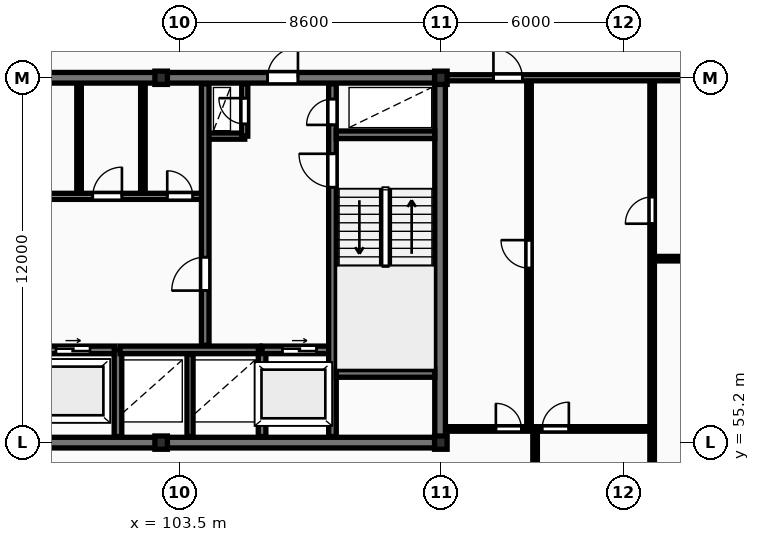
"""IFC4 building model, lengths in metres.
Left out: names, types, materials, properties, quantities, classifications, styles, units other than length and angle.
Written with IfcOpenShell. Run it as: python <this file> out.ifc"""

import sys

from ifc_helpers import new_model, si_unit, direction, frame, frame_2d, origin, origin_2d, place, context, subcontext, project, spatial, rectangle, i_section, extrude, element, fill, save


model = new_model("IFC4")
c1 = context("Model", 3, precision=1e-05, world=origin(), true_north=direction((0.0, 1.0)))
c2 = subcontext(c1, "Body", "Model", "MODEL_VIEW")
j1 = project(units=[si_unit("LENGTHUNIT", "METRE"), si_unit("PLANEANGLEUNIT", "RADIAN")], contexts=[c1])
p1 = place(None, origin())
s1 = spatial("IfcSite", under=j1, at=p1, CompositionType="ELEMENT")
p2 = place(p1, origin())
s2 = spatial("IfcBuilding", under=s1, at=p2, CompositionType="ELEMENT")
p3 = place(p2, frame((0.0, 0.0, 150.1)))
s3 = spatial("IfcBuildingStorey", under=s2, at=p3, CompositionType="ELEMENT", Elevation=150.1)
for number, where, z_axis, x_axis in (
    (1, (102.9, 55.2, 0.0), (0.0, 0.0, 1.0), (1.0, 0.0, 0.0)),
    (2, (102.9, 67.2, 0.0), (0.0, 0.0, 1.0), (1.0, 0.0, 0.0)),
    (3, (112.1, 55.2, 0.0), (0.0, 0.0, 1.0), (1.0, 0.0, 0.0)),
    (4, (112.1, 67.2, 0.0), (0.0, 0.0, 1.0), (1.0, 0.0, 0.0)),
):
    element("IfcColumn", number, at=place(p3, frame(where, z_axis=z_axis, x_axis=x_axis)), inside=s3, PredefinedType="COLUMN", context=c2, shape_type="SweptSolid", body=[
        extrude(i_section(OverallWidth=0.412, OverallDepth=0.437, WebThickness=0.036, FlangeThickness=0.052, FilletRadius=0.015, at=origin_2d()), origin(), (0.0, 0.0, 1.0), 3.6),
    ])
p4 = place(p3, frame((75.95, 55.2, 0.0), z_axis=(0.0, 0.0, 1.0), x_axis=(1.0, 0.0, 0.0)))
e5 = element("IfcWall", 5, at=p4, inside=s3, PredefinedType="SHEAR", context=c2, shape_type="SweptSolid", body=[
    extrude(rectangle(XDim=36.3, YDim=0.35, at=frame_2d((18.15, 0.0))), origin(), (0.0, 0.0, 1.0), 3.6),
])
p5 = place(p4, frame((15.1, 0.0, 0.0)))
e6 = element("IfcOpeningElement", 6, at=p5, cuts=e5, PredefinedType="OPENING", context=c2, shape_type="SweptSolid", body=[
    extrude(rectangle(XDim=1.1, YDim=2.1, at=frame_2d((0.55, 1.05))), frame((0.0, 0.185, 0.0), z_axis=(0.0, -1.0, 0.0), x_axis=(1.0, 0.0, 0.0)), (0.0, 0.0, 1.0), 0.37),
])
p6 = place(p3, frame((112.075, 55.375, 0.0), z_axis=(0.0, 0.0, 1.0), x_axis=(0.0, 1.0, 0.0)))
e7 = element("IfcWall", 7, at=p6, inside=s3, PredefinedType="SHEAR", context=c2, shape_type="SweptSolid", body=[
    extrude(rectangle(XDim=11.65, YDim=0.35, at=frame_2d((5.825, 0.0))), origin(), (0.0, 0.0, 1.0), 3.6),
])
p7 = place(p3, frame((75.95, 67.2, 0.0), z_axis=(0.0, 0.0, 1.0), x_axis=(1.0, 0.0, 0.0)))
e8 = element("IfcWall", 8, at=p7, inside=s3, PredefinedType="SHEAR", context=c2, shape_type="SweptSolid", body=[
    extrude(rectangle(XDim=36.3, YDim=0.35, at=frame_2d((18.15, 0.0))), origin(), (0.0, 0.0, 1.0), 3.6),
])
p8 = place(p7, frame((5.25, 0.0, 0.0)))
e9 = element("IfcOpeningElement", 9, at=p8, cuts=e8, PredefinedType="OPENING", context=c2, shape_type="SweptSolid", body=[
    extrude(rectangle(XDim=1.0, YDim=2.15, at=frame_2d((0.5, 1.075))), frame((0.0, 0.185, 0.0), z_axis=(0.0, -1.0, 0.0), x_axis=(1.0, 0.0, 0.0)), (0.0, 0.0, 1.0), 0.37),
])
p9 = place(p7, frame((21.6, 0.0, 0.0)))
e10 = element("IfcOpeningElement", 10, at=p9, cuts=e8, PredefinedType="OPENING", context=c2, shape_type="SweptSolid", body=[
    extrude(rectangle(XDim=1.5, YDim=2.2, at=frame_2d((0.75, 1.1))), frame((0.0, 0.185, 0.0), z_axis=(0.0, -1.0, 0.0), x_axis=(1.0, 0.0, 0.0)), (0.0, 0.0, 1.0), 0.37),
])
p10 = place(p7, frame((30.45, 0.0, 0.0)))
e11 = element("IfcOpeningElement", 11, at=p10, cuts=e8, PredefinedType="OPENING", context=c2, shape_type="SweptSolid", body=[
    extrude(rectangle(XDim=1.0, YDim=2.15, at=frame_2d((0.5, 1.075))), frame((0.0, 0.185, 0.0), z_axis=(0.0, -1.0, 0.0), x_axis=(1.0, 0.0, 0.0)), (0.0, 0.0, 1.0), 0.37),
])
p11 = place(p3, frame((93.02, 58.25, 0.0), z_axis=(0.0, 0.0, 1.0), x_axis=(1.0, 0.0, 0.0)))
e12 = element("IfcWall", 12, at=p11, inside=s3, PredefinedType="SHEAR", context=c2, shape_type="SweptSolid", body=[
    extrude(rectangle(XDim=8.36, YDim=0.25, at=frame_2d((4.18, 0.0))), origin(), (0.0, 0.0, 1.0), 3.6),
])
p12 = place(p11, frame((0.82, 0.0, 0.0)))
e13 = element("IfcOpeningElement", 13, at=p12, cuts=e12, PredefinedType="OPENING", context=c2, shape_type="SweptSolid", body=[
    extrude(rectangle(XDim=1.12, YDim=2.12, at=frame_2d((0.56, 1.06))), frame((0.0, 0.135, 0.0), z_axis=(0.0, -1.0, 0.0), x_axis=(1.0, 0.0, 0.0)), (0.0, 0.0, 1.0), 0.27),
])
p13 = place(p11, frame((3.62, 0.0, 0.0)))
e14 = element("IfcOpeningElement", 14, at=p13, cuts=e12, PredefinedType="OPENING", context=c2, shape_type="SweptSolid", body=[
    extrude(rectangle(XDim=1.12, YDim=2.12, at=frame_2d((0.56, 1.06))), frame((0.0, 0.135, 0.0), z_axis=(0.0, -1.0, 0.0), x_axis=(1.0, 0.0, 0.0)), (0.0, 0.0, 1.0), 0.27),
])
p14 = place(p11, frame((6.42, 0.0, 0.0)))
e15 = element("IfcOpeningElement", 15, at=p14, cuts=e12, PredefinedType="OPENING", context=c2, shape_type="SweptSolid", body=[
    extrude(rectangle(XDim=1.12, YDim=2.12, at=frame_2d((0.56, 1.06))), frame((0.0, 0.135, 0.0), z_axis=(0.0, -1.0, 0.0), x_axis=(1.0, 0.0, 0.0)), (0.0, 0.0, 1.0), 0.27),
])
p15 = place(p3, frame((101.48, 55.4, 0.0), z_axis=(0.0, 0.0, 1.0), x_axis=(0.0, 1.0, 0.0)))
e16 = element("IfcWall", 16, at=p15, inside=s3, PredefinedType="SHEAR", context=c2, shape_type="SweptSolid", body=[
    extrude(rectangle(XDim=2.85, YDim=0.25, at=frame_2d((1.425, 0.0))), origin(), (0.0, 0.0, 1.0), 3.6),
])
p16 = place(p3, frame((103.85, 55.4, 0.0), z_axis=(0.0, 0.0, 1.0), x_axis=(0.0, 1.0, 0.0)))
e17 = element("IfcWall", 17, at=p16, inside=s3, PredefinedType="PARTITIONING", context=c2, shape_type="SweptSolid", body=[
    extrude(rectangle(XDim=2.72, YDim=0.2, at=frame_2d((1.36, 0.0))), origin(), (0.0, 0.0, 1.0), 3.31),
])
p17 = place(p3, frame((101.55, 58.25, 0.0), z_axis=(0.0, 0.0, 1.0), x_axis=(1.0, 0.0, 0.0)))
e18 = element("IfcWall", 18, at=p17, inside=s3, PredefinedType="SHEAR", context=c2, shape_type="SweptSolid", body=[
    extrude(rectangle(XDim=4.6, YDim=0.25, at=frame_2d((2.3, 0.0))), origin(), (0.0, 0.0, 1.0), 3.6),
])
p18 = place(p3, frame((106.22, 55.4, 0.0), z_axis=(0.0, 0.0, 1.0), x_axis=(0.0, 1.0, 0.0)))
e19 = element("IfcWall", 19, at=p18, inside=s3, PredefinedType="SHEAR", context=c2, shape_type="SweptSolid", body=[
    extrude(rectangle(XDim=2.85, YDim=0.25, at=frame_2d((1.425, 0.0))), origin(), (0.0, 0.0, 1.0), 3.6),
])
p19 = place(p3, frame((106.22, 58.25, 0.0), z_axis=(0.0, 0.0, 1.0), x_axis=(1.0, 0.0, 0.0)))
e20 = element("IfcWall", 20, at=p19, inside=s3, PredefinedType="SHEAR", context=c2, shape_type="SweptSolid", body=[
    extrude(rectangle(XDim=2.46, YDim=0.25, at=frame_2d((1.23, 0.0))), origin(), (0.0, 0.0, 1.0), 3.6),
])
p20 = place(p19, frame((0.67, 0.0, 0.0)))
e21 = element("IfcOpeningElement", 21, at=p20, cuts=e20, PredefinedType="OPENING", context=c2, shape_type="SweptSolid", body=[
    extrude(rectangle(XDim=1.12, YDim=2.12, at=frame_2d((0.56, 1.06))), frame((0.0, 0.135, 0.0), z_axis=(0.0, -1.0, 0.0), x_axis=(1.0, 0.0, 0.0)), (0.0, 0.0, 1.0), 0.27),
])
for number, where, z_axis, x_axis in (
    (22, (102.3, 63.4, 0.0), (0.0, 0.0, 1.0), (0.0, 1.0, 0.0)),
    (23, (100.2, 63.4, 0.0), (0.0, 0.0, 1.0), (0.0, 1.0, 0.0)),
):
    element("IfcWall", number, at=place(p3, frame(where, z_axis=z_axis, x_axis=x_axis)), inside=s3, PredefinedType="PARTITIONING", context=c2, shape_type="SweptSolid", body=[
        extrude(rectangle(XDim=3.6, YDim=0.15, at=frame_2d((1.8, 0.0))), origin(), (0.0, 0.0, 1.0), 3.31),
    ])
p21 = place(p3, frame((84.42, 63.3, 0.0), z_axis=(0.0, 0.0, 1.0), x_axis=(1.0, 0.0, 0.0)))
e24 = element("IfcWall", 24, at=p21, inside=s3, PredefinedType="PARTITIONING", context=c2, shape_type="SweptSolid", body=[
    extrude(rectangle(XDim=19.83, YDim=0.2, at=frame_2d((9.915, 0.0))), origin(), (0.0, 0.0, 1.0), 3.31),
])
p22 = place(p21, frame((1.15, 0.0, 0.0)))
e25 = element("IfcOpeningElement", 25, at=p22, cuts=e24, PredefinedType="OPENING", context=c2, shape_type="SweptSolid", body=[
    extrude(rectangle(XDim=0.85, YDim=2.05, at=frame_2d((0.425, 1.025))), frame((0.0, 0.11, 0.0), z_axis=(0.0, -1.0, 0.0), x_axis=(1.0, 0.0, 0.0)), (0.0, 0.0, 1.0), 0.22),
])
p23 = place(p21, frame((3.25, 0.0, 0.0)))
e26 = element("IfcOpeningElement", 26, at=p23, cuts=e24, PredefinedType="OPENING", context=c2, shape_type="SweptSolid", body=[
    extrude(rectangle(XDim=0.85, YDim=2.05, at=frame_2d((0.425, 1.025))), frame((0.0, 0.11, 0.0), z_axis=(0.0, -1.0, 0.0), x_axis=(1.0, 0.0, 0.0)), (0.0, 0.0, 1.0), 0.22),
])
p24 = place(p21, frame((13.08, 0.0, 0.0)))
e27 = element("IfcOpeningElement", 27, at=p24, cuts=e24, PredefinedType="OPENING", context=c2, shape_type="SweptSolid", body=[
    extrude(rectangle(XDim=1.5, YDim=2.2, at=frame_2d((0.75, 1.1))), frame((0.0, 0.11, 0.0), z_axis=(0.0, -1.0, 0.0), x_axis=(1.0, 0.0, 0.0)), (0.0, 0.0, 1.0), 0.22),
])
p25 = place(p21, frame((5.53, 0.0, 0.0)))
e28 = element("IfcOpeningElement", 28, at=p25, cuts=e24, PredefinedType="OPENING", context=c2, shape_type="SweptSolid", body=[
    extrude(rectangle(XDim=0.88, YDim=2.06, at=frame_2d((0.44, 1.03))), frame((0.0, 0.11, 0.0), z_axis=(0.0, -1.0, 0.0), x_axis=(1.0, 0.0, 0.0)), (0.0, 0.0, 1.0), 0.22),
])
p26 = place(p21, frame((7.68, 0.0, 0.0)))
e29 = element("IfcOpeningElement", 29, at=p26, cuts=e24, PredefinedType="OPENING", context=c2, shape_type="SweptSolid", body=[
    extrude(rectangle(XDim=0.88, YDim=2.06, at=frame_2d((0.44, 1.03))), frame((0.0, 0.11, 0.0), z_axis=(0.0, -1.0, 0.0), x_axis=(1.0, 0.0, 0.0)), (0.0, 0.0, 1.0), 0.22),
])
p27 = place(p21, frame((10.43, 0.0, 0.0)))
e30 = element("IfcOpeningElement", 30, at=p27, cuts=e24, PredefinedType="OPENING", context=c2, shape_type="SweptSolid", body=[
    extrude(rectangle(XDim=0.85, YDim=2.05, at=frame_2d((0.425, 1.025))), frame((0.0, 0.11, 0.0), z_axis=(0.0, -1.0, 0.0), x_axis=(1.0, 0.0, 0.0)), (0.0, 0.0, 1.0), 0.22),
])
p28 = place(p21, frame((16.23, 0.0, 0.0)))
e31 = element("IfcOpeningElement", 31, at=p28, cuts=e24, PredefinedType="OPENING", context=c2, shape_type="SweptSolid", body=[
    extrude(rectangle(XDim=0.96, YDim=2.1, at=frame_2d((0.48, 1.05))), frame((0.0, 0.11, 0.0), z_axis=(0.0, -1.0, 0.0), x_axis=(1.0, 0.0, 0.0)), (0.0, 0.0, 1.0), 0.22),
])
p29 = place(p21, frame((18.68, 0.0, 0.0)))
e32 = element("IfcOpeningElement", 32, at=p29, cuts=e24, PredefinedType="OPENING", context=c2, shape_type="SweptSolid", body=[
    extrude(rectangle(XDim=0.84, YDim=2.04, at=frame_2d((0.42, 1.02))), frame((0.0, 0.11, 0.0), z_axis=(0.0, -1.0, 0.0), x_axis=(1.0, 0.0, 0.0)), (0.0, 0.0, 1.0), 0.22),
])
p30 = place(p3, frame((104.45, 65.28, 0.0), z_axis=(0.0, 0.0, 1.0), x_axis=(1.0, 0.0, 0.0)))
e33 = element("IfcWall", 33, at=p30, inside=s3, PredefinedType="PARTITIONING", context=c2, shape_type="SweptSolid", body=[
    extrude(rectangle(XDim=1.2, YDim=0.2, at=frame_2d((0.6, 0.0))), origin(), (0.0, 0.0, 1.0), 3.31),
])
p31 = place(p3, frame((105.65, 65.28, 0.0), z_axis=(0.0, 0.0, 1.0), x_axis=(0.0, 1.0, 0.0)))
e34 = element("IfcWall", 34, at=p31, inside=s3, PredefinedType="PARTITIONING", context=c2, shape_type="SweptSolid", body=[
    extrude(rectangle(XDim=1.72, YDim=0.2, at=frame_2d((0.86, 0.0))), origin(), (0.0, 0.0, 1.0), 3.31),
])
p32 = place(p31, frame((0.4, 0.0, 0.0)))
e35 = element("IfcOpeningElement", 35, at=p32, cuts=e34, PredefinedType="OPENING", context=c2, shape_type="SweptSolid", body=[
    extrude(rectangle(XDim=0.85, YDim=2.05, at=frame_2d((0.425, 1.025))), frame((0.0, 0.11, 0.0), z_axis=(0.0, -1.0, 0.0), x_axis=(1.0, 0.0, 0.0)), (0.0, 0.0, 1.0), 0.22),
])
p33 = place(p3, frame((104.35, 58.4, 0.0), z_axis=(0.0, 0.0, 1.0), x_axis=(0.0, 1.0, 0.0)))
e36 = element("IfcWall", 36, at=p33, inside=s3, PredefinedType="SHEAR", context=c2, shape_type="SweptSolid", body=[
    extrude(rectangle(XDim=8.6, YDim=0.25, at=frame_2d((4.3, 0.0))), origin(), (0.0, 0.0, 1.0), 3.6),
])
p34 = place(p33, frame((1.8, 0.0, 0.0)))
e37 = element("IfcOpeningElement", 37, at=p34, cuts=e36, PredefinedType="OPENING", context=c2, shape_type="SweptSolid", body=[
    extrude(rectangle(XDim=1.1, YDim=2.1, at=frame_2d((0.55, 1.05))), frame((0.0, 0.135, 0.0), z_axis=(0.0, -1.0, 0.0), x_axis=(1.0, 0.0, 0.0)), (0.0, 0.0, 1.0), 0.27),
])
p35 = place(p3, frame((108.535, 55.4, 0.0), z_axis=(0.0, 0.0, 1.0), x_axis=(0.0, 1.0, 0.0)))
e38 = element("IfcWall", 38, at=p35, inside=s3, PredefinedType="SHEAR", context=c2, shape_type="SweptSolid", body=[
    extrude(rectangle(XDim=11.6, YDim=0.25, at=frame_2d((5.8, 0.0))), origin(), (0.0, 0.0, 1.0), 3.6),
])
p36 = place(p35, frame((8.2, 0.0, 0.0)))
e39 = element("IfcOpeningElement", 39, at=p36, cuts=e38, PredefinedType="OPENING", context=c2, shape_type="SweptSolid", body=[
    extrude(rectangle(XDim=1.1, YDim=2.1, at=frame_2d((0.55, 1.05))), frame((0.0, 0.135, 0.0), z_axis=(0.0, -1.0, 0.0), x_axis=(1.0, 0.0, 0.0)), (0.0, 0.0, 1.0), 0.27),
])
p37 = place(p35, frame((10.25, 0.0, 0.0)))
e40 = element("IfcOpeningElement", 40, at=p37, cuts=e38, PredefinedType="OPENING", context=c2, shape_type="SweptSolid", body=[
    extrude(rectangle(XDim=0.85, YDim=2.05, at=frame_2d((0.425, 1.025))), frame((0.0, 0.135, 0.0), z_axis=(0.0, -1.0, 0.0), x_axis=(1.0, 0.0, 0.0)), (0.0, 0.0, 1.0), 0.27),
])
for number, where, z_axis, x_axis in (
    (41, (108.66, 57.475, 0.0), (0.0, 0.0, 1.0), (1.0, 0.0, 0.0)),
    (42, (108.66, 65.325, 0.0), (0.0, 0.0, 1.0), (1.0, 0.0, 0.0)),
):
    element("IfcWall", number, at=place(p3, frame(where, z_axis=z_axis, x_axis=x_axis)), inside=s3, PredefinedType="SHEAR", context=c2, shape_type="SweptSolid", body=[
        extrude(rectangle(XDim=3.24, YDim=0.25, at=frame_2d((1.62, 0.0))), origin(), (0.0, 0.0, 1.0), 3.6),
    ])
p38 = place(p3, frame((119.05, 61.25, 0.0), z_axis=(0.0, 0.0, 1.0), x_axis=(1.0, 0.0, 0.0)))
e43 = element("IfcWall", 43, at=p38, inside=s3, PredefinedType="PARTITIONING", context=c2, shape_type="SweptSolid", body=[
    extrude(rectangle(XDim=11.55, YDim=0.15, at=frame_2d((5.775, 0.0))), origin(), (0.0, 0.0, 1.0), 3.31),
])
p39 = place(p38, frame((5.355, 0.0, 0.0)))
e44 = element("IfcOpeningElement", 44, at=p39, cuts=e43, PredefinedType="OPENING", context=c2, shape_type="SweptSolid", body=[
    extrude(rectangle(XDim=0.84, YDim=2.04, at=frame_2d((0.42, 1.02))), frame((0.0, 0.085, 0.0), z_axis=(0.0, -1.0, 0.0), x_axis=(1.0, 0.0, 0.0)), (0.0, 0.0, 1.0), 0.17),
])
p40 = place(p3, frame((119.05, 51.1, 0.0), z_axis=(0.0, 0.0, 1.0), x_axis=(0.0, 1.0, 0.0)))
e45 = element("IfcWall", 45, at=p40, inside=s3, PredefinedType="PARTITIONING", context=c2, shape_type="SweptSolid", body=[
    extrude(rectangle(XDim=16.05, YDim=0.15, at=frame_2d((8.025, 0.0))), origin(), (0.0, 0.0, 1.0), 3.31),
])
p41 = place(p40, frame((11.3, 0.0, 0.0)))
e46 = element("IfcOpeningElement", 46, at=p41, cuts=e45, PredefinedType="OPENING", context=c2, shape_type="SweptSolid", body=[
    extrude(rectangle(XDim=0.88, YDim=2.06, at=frame_2d((0.44, 1.03))), frame((0.0, 0.085, 0.0), z_axis=(0.0, -1.0, 0.0), x_axis=(1.0, 0.0, 0.0)), (0.0, 0.0, 1.0), 0.17),
])
p42 = place(p3, frame((115.0, 55.65, 0.0), z_axis=(0.0, 0.0, 1.0), x_axis=(0.0, 1.0, 0.0)))
e47 = element("IfcWall", 47, at=p42, inside=s3, PredefinedType="PARTITIONING", context=c2, shape_type="SweptSolid", body=[
    extrude(rectangle(XDim=11.5, YDim=0.15, at=frame_2d((5.75, 0.0))), origin(), (0.0, 0.0, 1.0), 3.31),
])
p43 = place(p42, frame((5.29, 0.0, 0.0)))
e48 = element("IfcOpeningElement", 48, at=p43, cuts=e47, PredefinedType="OPENING", context=c2, shape_type="SweptSolid", body=[
    extrude(rectangle(XDim=0.92, YDim=2.08, at=frame_2d((0.46, 1.04))), frame((0.0, 0.085, 0.0), z_axis=(0.0, -1.0, 0.0), x_axis=(1.0, 0.0, 0.0)), (0.0, 0.0, 1.0), 0.17),
])
p44 = place(p3, frame((115.2, 51.1, 0.0), z_axis=(0.0, 0.0, 1.0), x_axis=(0.0, 1.0, 0.0)))
e49 = element("IfcWall", 49, at=p44, inside=s3, PredefinedType="PARTITIONING", context=c2, shape_type="SweptSolid", body=[
    extrude(rectangle(XDim=4.55, YDim=0.15, at=frame_2d((2.275, 0.0))), origin(), (0.0, 0.0, 1.0), 3.31),
])
p45 = place(p3, frame((112.27, 55.65, 0.0), z_axis=(0.0, 0.0, 1.0), x_axis=(1.0, 0.0, 0.0)))
e50 = element("IfcWall", 50, at=p45, inside=s3, PredefinedType="PARTITIONING", context=c2, shape_type="SweptSolid", body=[
    extrude(rectangle(XDim=6.76, YDim=0.15, at=frame_2d((3.38, 0.0))), origin(), (0.0, 0.0, 1.0), 3.31),
])
p46 = place(p45, frame((1.64, 0.0, 0.0)))
e51 = element("IfcOpeningElement", 51, at=p46, cuts=e50, PredefinedType="OPENING", context=c2, shape_type="SweptSolid", body=[
    extrude(rectangle(XDim=0.84, YDim=2.04, at=frame_2d((0.42, 1.02))), frame((0.0, 0.085, 0.0), z_axis=(0.0, -1.0, 0.0), x_axis=(1.0, 0.0, 0.0)), (0.0, 0.0, 1.0), 0.17),
])
p47 = place(p45, frame((3.16, 0.0, 0.0)))
e52 = element("IfcOpeningElement", 52, at=p47, cuts=e50, PredefinedType="OPENING", context=c2, shape_type="SweptSolid", body=[
    extrude(rectangle(XDim=0.88, YDim=2.06, at=frame_2d((0.44, 1.03))), frame((0.0, 0.085, 0.0), z_axis=(0.0, -1.0, 0.0), x_axis=(1.0, 0.0, 0.0)), (0.0, 0.0, 1.0), 0.17),
])
p48 = place(p3, frame((112.25, 67.2, 0.0), z_axis=(0.0, 0.0, 1.0), x_axis=(1.0, 0.0, 0.0)))
e53 = element("IfcWall", 53, at=p48, inside=s3, PredefinedType="PARTITIONING", context=c2, shape_type="SweptSolid", body=[
    extrude(rectangle(XDim=18.35, YDim=0.2, at=frame_2d((9.175, 0.0))), origin(), (0.0, 0.0, 1.0), 2.773),
])
p49 = place(p48, frame((1.58, 0.0, 0.0)))
e54 = element("IfcOpeningElement", 54, at=p49, cuts=e53, PredefinedType="OPENING", context=c2, shape_type="SweptSolid", body=[
    extrude(rectangle(XDim=0.95, YDim=2.15, at=frame_2d((0.475, 1.075))), frame((0.0, 0.11, 0.0), z_axis=(0.0, -1.0, 0.0), x_axis=(1.0, 0.0, 0.0)), (0.0, 0.0, 1.0), 0.22),
])
p50 = place(p10, origin())
e55 = element("IfcDoor", 55, at=p50, inside=s3, OperationType="SINGLE_SWING_RIGHT", PredefinedType="DOOR", context=c2, shape_type="SweptSolid", body=[
    extrude(rectangle(XDim=1.0, YDim=2.15, at=frame_2d((0.5, 1.075))), frame((0.0, 0.025, 0.0), z_axis=(0.0, -1.0, 0.0), x_axis=(1.0, 0.0, 0.0)), (0.0, 0.0, 1.0), 0.05),
])
fill(e11, e55)
p51 = place(p14, origin())
e56 = element("IfcDoor", 56, at=p51, inside=s3, OperationType="SLIDING_TO_RIGHT", PredefinedType="DOOR", context=c2, shape_type="SweptSolid", body=[
    extrude(rectangle(XDim=1.12, YDim=2.12, at=frame_2d((0.56, 1.06))), frame((0.0, 0.025, 0.0), z_axis=(0.0, -1.0, 0.0), x_axis=(1.0, 0.0, 0.0)), (0.0, 0.0, 1.0), 0.05),
])
fill(e15, e56)
p52 = place(p20, origin())
e57 = element("IfcDoor", 57, at=p52, inside=s3, OperationType="SLIDING_TO_RIGHT", PredefinedType="DOOR", context=c2, shape_type="SweptSolid", body=[
    extrude(rectangle(XDim=1.12, YDim=2.12, at=frame_2d((0.56, 1.06))), frame((0.0, 0.025, 0.0), z_axis=(0.0, -1.0, 0.0), x_axis=(1.0, 0.0, 0.0)), (0.0, 0.0, 1.0), 0.05),
])
fill(e21, e57)
p53 = place(p28, origin())
e58 = element("IfcDoor", 58, at=p53, inside=s3, OperationType="SINGLE_SWING_RIGHT", PredefinedType="DOOR", context=c2, shape_type="SweptSolid", body=[
    extrude(rectangle(XDim=0.96, YDim=2.1, at=frame_2d((0.48, 1.05))), frame((0.0, 0.025, 0.0), z_axis=(0.0, -1.0, 0.0), x_axis=(1.0, 0.0, 0.0)), (0.0, 0.0, 1.0), 0.05),
])
fill(e31, e58)
p54 = place(p29, origin())
e59 = element("IfcDoor", 59, at=p54, inside=s3, OperationType="SINGLE_SWING_LEFT", PredefinedType="DOOR", context=c2, shape_type="SweptSolid", body=[
    extrude(rectangle(XDim=0.84, YDim=2.04, at=frame_2d((0.42, 1.02))), frame((0.0, 0.025, 0.0), z_axis=(0.0, -1.0, 0.0), x_axis=(1.0, 0.0, 0.0)), (0.0, 0.0, 1.0), 0.05),
])
fill(e32, e59)
p55 = place(p32, origin())
e60 = element("IfcDoor", 60, at=p55, inside=s3, OperationType="SINGLE_SWING_RIGHT", PredefinedType="DOOR", context=c2, shape_type="SweptSolid", body=[
    extrude(rectangle(XDim=0.85, YDim=2.05, at=frame_2d((0.425, 1.025))), frame((0.0, 0.025, 0.0), z_axis=(0.0, -1.0, 0.0), x_axis=(1.0, 0.0, 0.0)), (0.0, 0.0, 1.0), 0.05),
])
fill(e35, e60)
p56 = place(p34, origin())
e61 = element("IfcDoor", 61, at=p56, inside=s3, OperationType="SINGLE_SWING_LEFT", PredefinedType="DOOR", context=c2, shape_type="SweptSolid", body=[
    extrude(rectangle(XDim=1.1, YDim=2.1, at=frame_2d((0.55, 1.05))), frame((0.0, 0.025, 0.0), z_axis=(0.0, -1.0, 0.0), x_axis=(1.0, 0.0, 0.0)), (0.0, 0.0, 1.0), 0.05),
])
fill(e37, e61)
p57 = place(p36, origin())
e62 = element("IfcDoor", 62, at=p57, inside=s3, OperationType="SINGLE_SWING_RIGHT", PredefinedType="DOOR", context=c2, shape_type="SweptSolid", body=[
    extrude(rectangle(XDim=1.1, YDim=2.1, at=frame_2d((0.55, 1.05))), frame((0.0, 0.025, 0.0), z_axis=(0.0, -1.0, 0.0), x_axis=(1.0, 0.0, 0.0)), (0.0, 0.0, 1.0), 0.05),
])
fill(e39, e62)
p58 = place(p37, origin())
e63 = element("IfcDoor", 63, at=p58, inside=s3, OperationType="SINGLE_SWING_LEFT", PredefinedType="DOOR", context=c2, shape_type="SweptSolid", body=[
    extrude(rectangle(XDim=0.85, YDim=2.05, at=frame_2d((0.425, 1.025))), frame((0.0, 0.025, 0.0), z_axis=(0.0, -1.0, 0.0), x_axis=(1.0, 0.0, 0.0)), (0.0, 0.0, 1.0), 0.05),
])
fill(e40, e63)
p59 = place(p41, origin())
e64 = element("IfcDoor", 64, at=p59, inside=s3, OperationType="SINGLE_SWING_LEFT", PredefinedType="DOOR", context=c2, shape_type="SweptSolid", body=[
    extrude(rectangle(XDim=0.88, YDim=2.06, at=frame_2d((0.44, 1.03))), frame((0.0, 0.025, 0.0), z_axis=(0.0, -1.0, 0.0), x_axis=(1.0, 0.0, 0.0)), (0.0, 0.0, 1.0), 0.05),
])
fill(e46, e64)
p60 = place(p43, origin())
e65 = element("IfcDoor", 65, at=p60, inside=s3, OperationType="SINGLE_SWING_RIGHT", PredefinedType="DOOR", context=c2, shape_type="SweptSolid", body=[
    extrude(rectangle(XDim=0.92, YDim=2.08, at=frame_2d((0.46, 1.04))), frame((0.0, 0.025, 0.0), z_axis=(0.0, -1.0, 0.0), x_axis=(1.0, 0.0, 0.0)), (0.0, 0.0, 1.0), 0.05),
])
fill(e48, e65)
p61 = place(p46, origin())
e66 = element("IfcDoor", 66, at=p61, inside=s3, OperationType="SINGLE_SWING_LEFT", PredefinedType="DOOR", context=c2, shape_type="SweptSolid", body=[
    extrude(rectangle(XDim=0.84, YDim=2.04, at=frame_2d((0.42, 1.02))), frame((0.0, 0.025, 0.0), z_axis=(0.0, -1.0, 0.0), x_axis=(1.0, 0.0, 0.0)), (0.0, 0.0, 1.0), 0.05),
])
fill(e51, e66)
p62 = place(p47, origin())
e67 = element("IfcDoor", 67, at=p62, inside=s3, OperationType="SINGLE_SWING_RIGHT", PredefinedType="DOOR", context=c2, shape_type="SweptSolid", body=[
    extrude(rectangle(XDim=0.88, YDim=2.06, at=frame_2d((0.44, 1.03))), frame((0.0, 0.025, 0.0), z_axis=(0.0, -1.0, 0.0), x_axis=(1.0, 0.0, 0.0)), (0.0, 0.0, 1.0), 0.05),
])
fill(e52, e67)
p63 = place(p49, origin())
e68 = element("IfcDoor", 68, at=p63, inside=s3, OperationType="SINGLE_SWING_LEFT", PredefinedType="DOOR", context=c2, shape_type="SweptSolid", body=[
    extrude(rectangle(XDim=0.95, YDim=2.15, at=frame_2d((0.475, 1.075))), frame((0.0, 0.025, 0.0), z_axis=(0.0, -1.0, 0.0), x_axis=(1.0, 0.0, 0.0)), (0.0, 0.0, 1.0), 0.05),
])
fill(e54, e68)
save(model, sys.argv[1])
